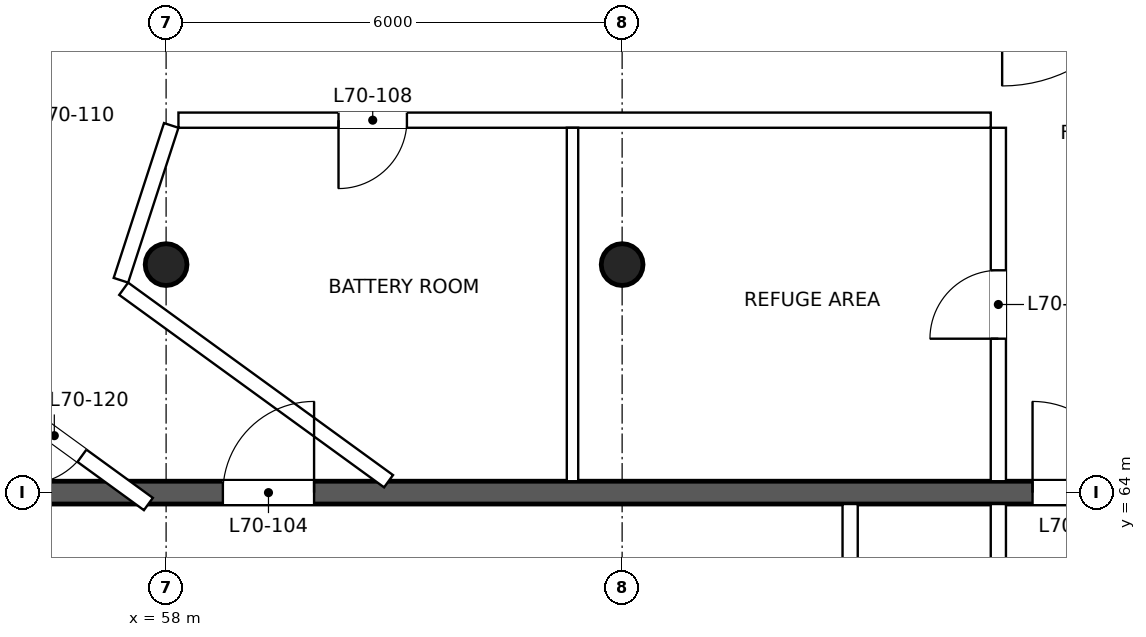
"""IFC4 building model, lengths in metres.
Left out: names, types, materials, properties, quantities, classifications, styles, units other than length and angle.
Written with IfcOpenShell. Run it as: python <this file> out.ifc"""

import sys

from ifc_helpers import new_model, si_unit, direction, frame, frame_2d, origin, origin_2d, place, context, subcontext, project, spatial, rectangle, circle, extrude, element, fill, save


model = new_model("IFC4")
c1 = context("Model", 3, precision=1e-05, world=origin(), true_north=direction((0.0, 1.0)))
c2 = subcontext(c1, "Body", "Model", "MODEL_VIEW")
j1 = project(units=[si_unit("LENGTHUNIT", "METRE"), si_unit("PLANEANGLEUNIT", "RADIAN")], contexts=[c1])
p1 = place(None, origin())
s1 = spatial("IfcSite", under=j1, at=p1, CompositionType="ELEMENT")
p2 = place(p1, origin())
s2 = spatial("IfcBuilding", under=s1, at=p2, CompositionType="ELEMENT")
p3 = place(p2, frame((0.0, 0.0, 295.1)))
s3 = spatial("IfcBuildingStorey", under=s2, at=p3, CompositionType="ELEMENT", Elevation=295.1)
for number, where, z_axis, x_axis in (
    (1, (58.0, 67.0, 0.0), (0.0, 0.0, 1.0), (1.0, 0.0, 0.0)),
    (2, (64.0, 67.0, 0.0), (0.0, 0.0, 1.0), (1.0, 0.0, 0.0)),
):
    element("IfcColumn", number, at=place(p3, frame(where, z_axis=z_axis, x_axis=x_axis)), inside=s3, PredefinedType="COLUMN", context=c2, shape_type="SweptSolid", body=[
        extrude(circle(Radius=0.275, at=origin_2d()), origin(), (0.0, 0.0, 1.0), 5.0),
    ])
p4 = place(p3, frame((48.433, 64.0, 0.0), z_axis=(0.0, 0.0, 1.0), x_axis=(1.0, 0.0, 0.0)))
e3 = element("IfcWall", 3, at=p4, inside=s3, PredefinedType="PARTITIONING", context=c2, shape_type="SweptSolid", body=[
    extrude(rectangle(XDim=43.134, YDim=0.3, at=frame_2d((21.567, 0.0))), origin(), (0.0, 0.0, 1.0), 3.9),
])
p5 = place(p4, frame((10.314, 0.0, 0.0)))
e4 = element("IfcOpeningElement", 4, at=p5, cuts=e3, PredefinedType="OPENING", context=c2, shape_type="SweptSolid", body=[
    extrude(rectangle(XDim=1.2, YDim=2.1, at=frame_2d((0.6, 1.05))), frame((0.0, 0.16, 0.0), z_axis=(0.0, -1.0, 0.0), x_axis=(1.0, 0.0, 0.0)), (0.0, 0.0, 1.0), 0.32),
])
p6 = place(p4, frame((20.967, 0.0, 0.0)))
e5 = element("IfcOpeningElement", 5, at=p6, cuts=e3, PredefinedType="OPENING", context=c2, shape_type="SweptSolid", body=[
    extrude(rectangle(XDim=1.2, YDim=2.1, at=frame_2d((0.6, 1.05))), frame((0.0, 0.16, 0.0), z_axis=(0.0, -1.0, 0.0), x_axis=(1.0, 0.0, 0.0)), (0.0, 0.0, 1.0), 0.32),
])
p7 = place(p4, frame((31.62, 0.0, 0.0)))
e6 = element("IfcOpeningElement", 6, at=p7, cuts=e3, PredefinedType="OPENING", context=c2, shape_type="SweptSolid", body=[
    extrude(rectangle(XDim=1.2, YDim=2.1, at=frame_2d((0.6, 1.05))), frame((0.0, 0.16, 0.0), z_axis=(0.0, -1.0, 0.0), x_axis=(1.0, 0.0, 0.0)), (0.0, 0.0, 1.0), 0.32),
])
p8 = place(p3, frame((57.767, 63.85, 0.0), z_axis=(0.0, 0.0, 1.0), x_axis=(-0.809065647846, 0.587718280705, 0.0)))
e7 = element("IfcWall", 7, at=p8, inside=s3, PredefinedType="PARTITIONING", context=c2, shape_type="SweptSolid", body=[
    extrude(rectangle(XDim=2.946, YDim=0.2, at=frame_2d((1.473, 0.0))), origin(), (0.0, 0.0, 1.0), 3.6),
])
p9 = place(p8, frame((1.08, 0.0, 0.0)))
e8 = element("IfcOpeningElement", 8, at=p9, cuts=e7, PredefinedType="OPENING", context=c2, shape_type="SweptSolid", body=[
    extrude(rectangle(XDim=0.9, YDim=2.1, at=frame_2d((0.45, 1.05))), frame((0.0, 0.11, 0.0), z_axis=(0.0, -1.0, 0.0), x_axis=(1.0, 0.0, 0.0)), (0.0, 0.0, 1.0), 0.22),
])
p10 = place(p3, frame((55.094, 66.474, 0.0), z_axis=(0.0, 0.0, 1.0), x_axis=(0.30901978602, 0.95105560923, 0.0)))
e9 = element("IfcWall", 9, at=p10, inside=s3, PredefinedType="PARTITIONING", context=c2, shape_type="SweptSolid", body=[
    extrude(rectangle(XDim=5.83, YDim=0.2, at=frame_2d((2.915, 0.0))), origin(), (0.0, 0.0, 1.0), 4.6),
])
p11 = place(p10, frame((2.157, 0.0, 0.0)))
e10 = element("IfcOpeningElement", 10, at=p11, cuts=e9, PredefinedType="OPENING", context=c2, shape_type="SweptSolid", body=[
    extrude(rectangle(XDim=0.9, YDim=2.1, at=frame_2d((0.45, 1.05))), frame((0.0, 0.11, 0.0), z_axis=(0.0, -1.0, 0.0), x_axis=(1.0, 0.0, 0.0)), (0.0, 0.0, 1.0), 0.22),
])
p12 = place(p3, frame((68.95, 58.517, 0.0), z_axis=(0.0, 0.0, 1.0), x_axis=(0.0, 1.0, 0.0)))
e11 = element("IfcWall", 11, at=p12, inside=s3, PredefinedType="PARTITIONING", context=c2, shape_type="SweptSolid", body=[
    extrude(rectangle(XDim=5.333, YDim=0.2, at=frame_2d((2.667, 0.0))), origin(), (0.0, 0.0, 1.0), 3.6),
])
p13 = place(p3, frame((68.95, 64.15, 0.0), z_axis=(0.0, 0.0, 1.0), x_axis=(0.0, 1.0, 0.0)))
e12 = element("IfcWall", 12, at=p13, inside=s3, PredefinedType="PARTITIONING", context=c2, shape_type="SweptSolid", body=[
    extrude(rectangle(XDim=4.65, YDim=0.2, at=frame_2d((2.325, 0.0))), origin(), (0.0, 0.0, 1.0), 4.6),
])
p14 = place(p13, frame((1.875, 0.0, 0.0)))
e13 = element("IfcOpeningElement", 13, at=p14, cuts=e12, PredefinedType="OPENING", context=c2, shape_type="SweptSolid", body=[
    extrude(rectangle(XDim=0.9, YDim=2.1, at=frame_2d((0.45, 1.05))), frame((0.0, 0.11, 0.0), z_axis=(0.0, -1.0, 0.0), x_axis=(1.0, 0.0, 0.0)), (0.0, 0.0, 1.0), 0.22),
])
p15 = place(p3, frame((68.85, 68.9, 0.0), z_axis=(0.0, 0.0, 1.0), x_axis=(-1.0, 0.0, 0.0)))
e14 = element("IfcWall", 14, at=p15, inside=s3, PredefinedType="PARTITIONING", context=c2, shape_type="SweptSolid", body=[
    extrude(rectangle(XDim=10.688, YDim=0.2, at=frame_2d((5.344, 0.0))), origin(), (0.0, 0.0, 1.0), 4.6),
])
p16 = place(p15, frame((7.681, 0.0, 0.0)))
e15 = element("IfcOpeningElement", 15, at=p16, cuts=e14, PredefinedType="OPENING", context=c2, shape_type="SweptSolid", body=[
    extrude(rectangle(XDim=0.9, YDim=2.1, at=frame_2d((0.45, 1.05))), frame((0.0, 0.11, 0.0), z_axis=(0.0, -1.0, 0.0), x_axis=(1.0, 0.0, 0.0)), (0.0, 0.0, 1.0), 0.22),
])
p17 = place(p3, frame((58.067, 68.831, 0.0), z_axis=(0.0, 0.0, 1.0), x_axis=(-0.309003597347, -0.951060869149, 0.0)))
e16 = element("IfcWall", 16, at=p17, inside=s3, PredefinedType="PARTITIONING", context=c2, shape_type="SweptSolid", body=[
    extrude(rectangle(XDim=2.142, YDim=0.2, at=frame_2d((1.071, 0.0))), origin(), (0.0, 0.0, 1.0), 4.6),
])
p18 = place(p3, frame((57.442, 66.682, 0.0), z_axis=(0.0, 0.0, 1.0), x_axis=(0.809027628487, -0.587770615414, 0.0)))
e17 = element("IfcWall", 17, at=p18, inside=s3, PredefinedType="PARTITIONING", context=c2, shape_type="SweptSolid", body=[
    extrude(rectangle(XDim=4.308, YDim=0.2, at=frame_2d((2.154, 0.0))), origin(), (0.0, 0.0, 1.0), 3.6),
])
p19 = place(p3, frame((67.0, 63.85, 0.0), z_axis=(0.0, 0.0, 1.0), x_axis=(0.0, -1.0, 0.0)))
e18 = element("IfcWall", 18, at=p19, inside=s3, PredefinedType="PARTITIONING", context=c2, shape_type="SweptSolid", body=[
    extrude(rectangle(XDim=4.062, YDim=0.2, at=frame_2d((2.031, 0.0))), origin(), (0.0, 0.0, 1.0), 4.6),
])
p20 = place(p3, frame((63.347, 64.15, 0.0), z_axis=(0.0, 0.0, 1.0), x_axis=(0.0, 1.0, 0.0)))
e19 = element("IfcWall", 19, at=p20, inside=s3, PredefinedType="PARTITIONING", context=c2, shape_type="SweptSolid", body=[
    extrude(rectangle(XDim=4.65, YDim=0.15, at=frame_2d((2.325, 0.0))), origin(), (0.0, 0.0, 1.0), 4.6),
])
p21 = place(p5, origin())
e20 = element("IfcDoor", 20, at=p21, inside=s3, OperationType="SINGLE_SWING_RIGHT", PredefinedType="DOOR", context=c2, shape_type="SweptSolid", body=[
    extrude(rectangle(XDim=1.2, YDim=2.1, at=frame_2d((0.6, 1.05))), frame((0.0, 0.025, 0.0), z_axis=(0.0, -1.0, 0.0), x_axis=(1.0, 0.0, 0.0)), (0.0, 0.0, 1.0), 0.05),
])
fill(e4, e20)
p22 = place(p6, origin())
e21 = element("IfcDoor", 21, at=p22, inside=s3, OperationType="SINGLE_SWING_LEFT", PredefinedType="DOOR", context=c2, shape_type="SweptSolid", body=[
    extrude(rectangle(XDim=1.2, YDim=2.1, at=frame_2d((0.6, 1.05))), frame((0.0, 0.025, 0.0), z_axis=(0.0, -1.0, 0.0), x_axis=(1.0, 0.0, 0.0)), (0.0, 0.0, 1.0), 0.05),
])
fill(e5, e21)
p23 = place(p16, origin())
e22 = element("IfcDoor", 22, at=p23, inside=s3, OperationType="SINGLE_SWING_RIGHT", PredefinedType="DOOR", context=c2, shape_type="SweptSolid", body=[
    extrude(rectangle(XDim=0.9, YDim=2.1, at=frame_2d((0.45, 1.05))), frame((0.0, 0.025, 0.0), z_axis=(0.0, -1.0, 0.0), x_axis=(1.0, 0.0, 0.0)), (0.0, 0.0, 1.0), 0.05),
])
fill(e15, e22)
p24 = place(p14, origin())
e23 = element("IfcDoor", 23, at=p24, inside=s3, OperationType="SINGLE_SWING_LEFT", PredefinedType="DOOR", context=c2, shape_type="SweptSolid", body=[
    extrude(rectangle(XDim=0.9, YDim=2.1, at=frame_2d((0.45, 1.05))), frame((0.0, 0.025, 0.0), z_axis=(0.0, -1.0, 0.0), x_axis=(1.0, 0.0, 0.0)), (0.0, 0.0, 1.0), 0.05),
])
fill(e13, e23)
p25 = place(p9, origin())
e24 = element("IfcDoor", 24, at=p25, inside=s3, OperationType="SINGLE_SWING_RIGHT", PredefinedType="DOOR", context=c2, shape_type="SweptSolid", body=[
    extrude(rectangle(XDim=0.9, YDim=2.1, at=frame_2d((0.45, 1.05))), frame((0.0, 0.025, 0.0), z_axis=(0.0, -1.0, 0.0), x_axis=(1.0, 0.0, 0.0)), (0.0, 0.0, 1.0), 0.05),
])
fill(e8, e24)
save(model, sys.argv[1])
